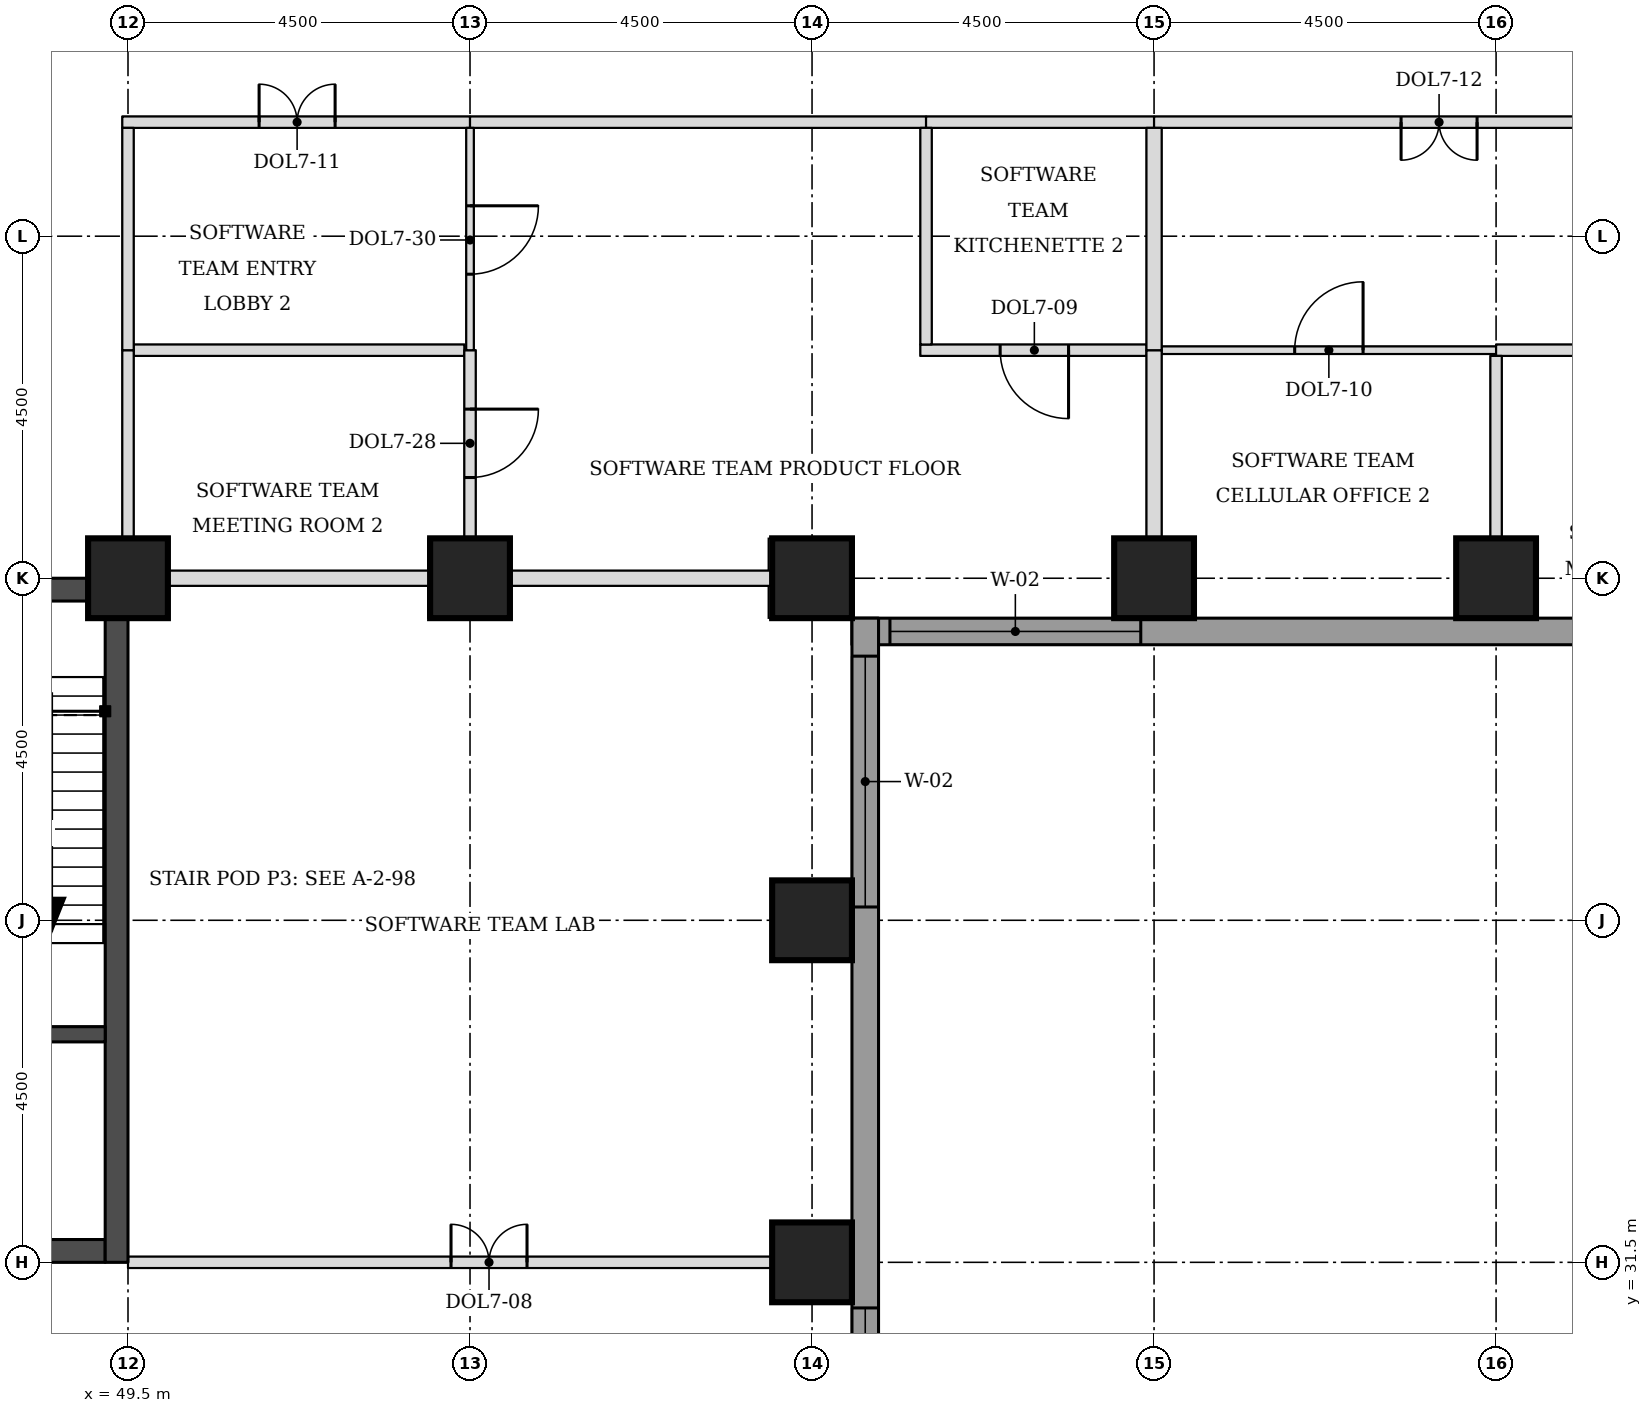
"""IFC4 building model, lengths in metres.
Left out: names, types, materials, properties, quantities, classifications, styles, units other than length and angle.
Written with IfcOpenShell. Run it as: python <this file> out.ifc"""

import sys

from ifc_helpers import new_model, si_unit, direction, frame, frame_2d, origin, origin_2d, place, context, subcontext, project, spatial, rectangle, extrude, element, fill, save


model = new_model("IFC4")
c1 = context("Model", 3, precision=1e-05, world=origin(), true_north=direction((0.0, 1.0)))
c2 = subcontext(c1, "Body", "Model", "MODEL_VIEW")
j1 = project(units=[si_unit("LENGTHUNIT", "METRE"), si_unit("PLANEANGLEUNIT", "RADIAN")], contexts=[c1])
p1 = place(None, origin())
s1 = spatial("IfcSite", under=j1, at=p1, CompositionType="ELEMENT")
p2 = place(p1, origin())
s2 = spatial("IfcBuilding", under=s1, at=p2, CompositionType="ELEMENT")
p3 = place(p2, frame((0.0, 0.0, 127.0)))
s3 = spatial("IfcBuildingStorey", under=s2, at=p3, CompositionType="ELEMENT", Elevation=127.0)
for number, where, z_axis, x_axis in (
    (1, (58.5, 31.5, 0.0), (0.0, 0.0, 1.0), (1.0, 0.0, 0.0)),
    (2, (58.5, 36.0, 0.0), (0.0, 0.0, 1.0), (1.0, 0.0, 0.0)),
    (3, (49.5, 40.5, 0.0), (0.0, 0.0, 1.0), (1.0, 0.0, 0.0)),
    (4, (54.0, 40.5, 0.0), (0.0, 0.0, 1.0), (1.0, 0.0, 0.0)),
    (5, (58.5, 40.5, 0.0), (0.0, 0.0, 1.0), (1.0, 0.0, 0.0)),
    (6, (63.0, 40.5, 0.0), (0.0, 0.0, 1.0), (1.0, 0.0, 0.0)),
    (7, (67.5, 40.5, 0.0), (0.0, 0.0, 1.0), (1.0, 0.0, 0.0)),
):
    element("IfcColumn", number, at=place(p3, frame(where, z_axis=z_axis, x_axis=x_axis)), inside=s3, PredefinedType="COLUMN", context=c2, shape_type="SweptSolid", body=[
        extrude(rectangle(XDim=1.05, YDim=1.05, at=origin_2d()), origin(), (0.0, 0.0, 1.0), 3.7),
    ])
p4 = place(p3, frame((40.8, 31.65, 0.0), z_axis=(0.0, 0.0, 1.0), x_axis=(1.0, 0.0, 0.0)))
e8 = element("IfcWall", 8, at=p4, inside=s3, PredefinedType="SHEAR", context=c2, shape_type="SweptSolid", body=[
    extrude(rectangle(XDim=8.4, YDim=0.3, at=frame_2d((4.2, 0.0))), origin(), (0.0, 0.0, 1.0), 3.7),
])
p5 = place(p4, frame((5.2, 0.0, 0.0)))
e9 = element("IfcOpeningElement", 9, at=p5, cuts=e8, PredefinedType="OPENING", context=c2, shape_type="SweptSolid", body=[
    extrude(rectangle(XDim=1.0, YDim=2.1, at=frame_2d((0.5, 1.05))), frame((0.0, 0.16, 0.0), z_axis=(0.0, -1.0, 0.0), x_axis=(1.0, 0.0, 0.0)), (0.0, 0.0, 1.0), 0.32),
])
p6 = place(p3, frame((40.8, 40.35, 0.0), z_axis=(0.0, 0.0, 1.0), x_axis=(1.0, 0.0, 0.0)))
e10 = element("IfcWall", 10, at=p6, inside=s3, PredefinedType="SHEAR", context=c2, shape_type="SweptSolid", body=[
    extrude(rectangle(XDim=8.4, YDim=0.3, at=frame_2d((4.2, 0.0))), origin(), (0.0, 0.0, 1.0), 3.7),
])
p7 = place(p6, frame((6.4, 0.0, 0.0)))
e11 = element("IfcOpeningElement", 11, at=p7, cuts=e10, PredefinedType="OPENING", context=c2, shape_type="SweptSolid", body=[
    extrude(rectangle(XDim=1.1, YDim=2.1, at=frame_2d((0.55, 1.05))), frame((0.0, 0.16, 0.0), z_axis=(0.0, -1.0, 0.0), x_axis=(1.0, 0.0, 0.0)), (0.0, 0.0, 1.0), 0.32),
])
p8 = place(p3, frame((49.35, 31.5, 0.0), z_axis=(0.0, 0.0, 1.0), x_axis=(0.0, 1.0, 0.0)))
e12 = element("IfcWall", 12, at=p8, inside=s3, PredefinedType="SHEAR", context=c2, shape_type="SweptSolid", body=[
    extrude(rectangle(XDim=9.0, YDim=0.3, at=frame_2d((4.5, 0.0))), origin(), (0.0, 0.0, 1.0), 3.7),
])
p9 = place(p3, frame((59.025, 39.8, 0.0), z_axis=(0.0, 0.0, 1.0), x_axis=(1.0, 0.0, 0.0)))
e13 = element("IfcWall", 13, at=p9, inside=s3, PredefinedType="STANDARD", context=c2, shape_type="SweptSolid", body=[
    extrude(rectangle(XDim=13.337, YDim=0.35, at=frame_2d((6.669, 0.0))), origin(), (0.0, 0.0, 1.0), 3.525),
])
p10 = place(p9, frame((0.5, 0.0, 0.9)))
e14 = element("IfcOpeningElement", 14, at=p10, cuts=e13, PredefinedType="OPENING", context=c2, shape_type="SweptSolid", body=[
    extrude(rectangle(XDim=3.3, YDim=1.9, at=frame_2d((1.65, 0.95))), frame((0.0, 0.185, 0.0), z_axis=(0.0, -1.0, 0.0), x_axis=(1.0, 0.0, 0.0)), (0.0, 0.0, 1.0), 0.37),
])
p11 = place(p3, frame((59.2, 22.138, 0.0), z_axis=(0.0, 0.0, 1.0), x_axis=(0.0, 1.0, 0.0)))
e15 = element("IfcWall", 15, at=p11, inside=s3, PredefinedType="STANDARD", context=c2, shape_type="SweptSolid", body=[
    extrude(rectangle(XDim=17.837, YDim=0.35, at=frame_2d((8.919, 0.0))), origin(), (0.0, 0.0, 1.0), 3.525),
])
p12 = place(p11, frame((5.462, 0.0, 0.9)))
e16 = element("IfcOpeningElement", 16, at=p12, cuts=e15, PredefinedType="OPENING", context=c2, shape_type="SweptSolid", body=[
    extrude(rectangle(XDim=3.3, YDim=1.9, at=frame_2d((1.65, 0.95))), frame((0.0, 0.185, 0.0), z_axis=(0.0, -1.0, 0.0), x_axis=(1.0, 0.0, 0.0)), (0.0, 0.0, 1.0), 0.37),
])
p13 = place(p11, frame((14.037, 0.0, 0.9)))
e17 = element("IfcOpeningElement", 17, at=p13, cuts=e15, PredefinedType="OPENING", context=c2, shape_type="SweptSolid", body=[
    extrude(rectangle(XDim=3.3, YDim=1.9, at=frame_2d((1.65, 0.95))), frame((0.0, 0.185, 0.0), z_axis=(0.0, -1.0, 0.0), x_axis=(1.0, 0.0, 0.0)), (0.0, 0.0, 1.0), 0.37),
])
p14 = place(p3, frame((49.5, 31.5, 0.0), z_axis=(0.0, 0.0, 1.0), x_axis=(1.0, 0.0, 0.0)))
e18 = element("IfcWall", 18, at=p14, inside=s3, PredefinedType="PARTITIONING", context=c2, shape_type="SweptSolid", body=[
    extrude(rectangle(XDim=9.525, YDim=0.15, at=frame_2d((4.762, 0.0))), origin(), (0.0, 0.0, 1.0), 2.55),
])
p15 = place(p14, frame((4.25, 0.0, 0.0)))
e19 = element("IfcOpeningElement", 19, at=p15, cuts=e18, PredefinedType="OPENING", context=c2, shape_type="SweptSolid", body=[
    extrude(rectangle(XDim=1.0, YDim=2.1, at=frame_2d((0.5, 1.05))), frame((0.0, 0.085, 0.0), z_axis=(0.0, -1.0, 0.0), x_axis=(1.0, 0.0, 0.0)), (0.0, 0.0, 1.0), 0.17),
])
p16 = place(p3, frame((50.015, 40.5, 0.0), z_axis=(0.0, 0.0, 1.0), x_axis=(1.0, 0.0, 0.0)))
e20 = element("IfcWall", 20, at=p16, inside=s3, PredefinedType="PARTITIONING", context=c2, shape_type="SweptSolid", body=[
    extrude(rectangle(XDim=3.46, YDim=0.2, at=frame_2d((1.73, 0.0))), origin(), (0.0, 0.0, 1.0), 2.8),
])
p17 = place(p3, frame((54.495, 40.5, 0.0), z_axis=(0.0, 0.0, 1.0), x_axis=(1.0, 0.0, 0.0)))
e21 = element("IfcWall", 21, at=p17, inside=s3, PredefinedType="PARTITIONING", context=c2, shape_type="SweptSolid", body=[
    extrude(rectangle(XDim=3.48, YDim=0.2, at=frame_2d((1.74, 0.0))), origin(), (0.0, 0.0, 1.0), 2.8),
])
p18 = place(p3, frame((49.575, 43.5, 0.0), z_axis=(0.0, 0.0, 1.0), x_axis=(1.0, 0.0, 0.0)))
e22 = element("IfcWall", 22, at=p18, inside=s3, PredefinedType="PARTITIONING", context=c2, shape_type="SweptSolid", body=[
    extrude(rectangle(XDim=4.35, YDim=0.15, at=frame_2d((2.175, 0.0))), origin(), (0.0, 0.0, 1.0), 3.55),
])
p19 = place(p3, frame((59.925, 43.5, 0.0), z_axis=(0.0, 0.0, 1.0), x_axis=(1.0, 0.0, 0.0)))
e23 = element("IfcWall", 23, at=p19, inside=s3, PredefinedType="PARTITIONING", context=c2, shape_type="SweptSolid", body=[
    extrude(rectangle(XDim=2.975, YDim=0.15, at=frame_2d((1.487, 0.0))), origin(), (0.0, 0.0, 1.0), 3.55),
])
p20 = place(p19, frame((1.05, 0.0, 0.0)))
e24 = element("IfcOpeningElement", 24, at=p20, cuts=e23, PredefinedType="OPENING", context=c2, shape_type="SweptSolid", body=[
    extrude(rectangle(XDim=0.9, YDim=2.1, at=frame_2d((0.45, 1.05))), frame((0.0, 0.085, 0.0), z_axis=(0.0, -1.0, 0.0), x_axis=(1.0, 0.0, 0.0)), (0.0, 0.0, 1.0), 0.17),
])
p21 = place(p3, frame((63.1, 43.5, 0.0), z_axis=(0.0, 0.0, 1.0), x_axis=(1.0, 0.0, 0.0)))
e25 = element("IfcWall", 25, at=p21, inside=s3, PredefinedType="PARTITIONING", context=c2, shape_type="SweptSolid", body=[
    extrude(rectangle(XDim=4.4, YDim=0.1, at=frame_2d((2.2, 0.0))), origin(), (0.0, 0.0, 1.0), 3.55),
])
p22 = place(p21, frame((1.75, 0.0, 0.0)))
e26 = element("IfcOpeningElement", 26, at=p22, cuts=e25, PredefinedType="OPENING", context=c2, shape_type="SweptSolid", body=[
    extrude(rectangle(XDim=0.9, YDim=2.1, at=frame_2d((0.45, 1.05))), frame((0.0, 0.06, 0.0), z_axis=(0.0, -1.0, 0.0), x_axis=(1.0, 0.0, 0.0)), (0.0, 0.0, 1.0), 0.12),
])
p23 = place(p3, frame((67.5, 43.5, 0.0), z_axis=(0.0, 0.0, 1.0), x_axis=(1.0, 0.0, 0.0)))
e27 = element("IfcWall", 27, at=p23, inside=s3, PredefinedType="PARTITIONING", context=c2, shape_type="SweptSolid", body=[
    extrude(rectangle(XDim=4.575, YDim=0.15, at=frame_2d((2.288, 0.0))), origin(), (0.0, 0.0, 1.0), 3.55),
])
p24 = place(p3, frame((49.425, 46.5, 0.0), z_axis=(0.0, 0.0, 1.0), x_axis=(1.0, 0.0, 0.0)))
e28 = element("IfcWall", 28, at=p24, inside=s3, PredefinedType="PARTITIONING", context=c2, shape_type="SweptSolid", body=[
    extrude(rectangle(XDim=4.575, YDim=0.15, at=frame_2d((2.288, 0.0))), origin(), (0.0, 0.0, 1.0), 3.55),
])
p25 = place(p24, frame((1.8, 0.0, 0.0)))
e29 = element("IfcOpeningElement", 29, at=p25, cuts=e28, PredefinedType="OPENING", context=c2, shape_type="SweptSolid", body=[
    extrude(rectangle(XDim=1.0, YDim=2.1, at=frame_2d((0.5, 1.05))), frame((0.0, 0.085, 0.0), z_axis=(0.0, -1.0, 0.0), x_axis=(1.0, 0.0, 0.0)), (0.0, 0.0, 1.0), 0.17),
])
p26 = place(p3, frame((54.0, 46.5, 0.0), z_axis=(0.0, 0.0, 1.0), x_axis=(1.0, 0.0, 0.0)))
e30 = element("IfcWall", 30, at=p26, inside=s3, PredefinedType="PARTITIONING", context=c2, shape_type="SweptSolid", body=[
    extrude(rectangle(XDim=6.0, YDim=0.15, at=frame_2d((3.0, 0.0))), origin(), (0.0, 0.0, 1.0), 3.55),
])
p27 = place(p3, frame((60.0, 46.5, 0.0), z_axis=(0.0, 0.0, 1.0), x_axis=(1.0, 0.0, 0.0)))
e31 = element("IfcWall", 31, at=p27, inside=s3, PredefinedType="PARTITIONING", context=c2, shape_type="SweptSolid", body=[
    extrude(rectangle(XDim=3.0, YDim=0.15, at=frame_2d((1.5, 0.0))), origin(), (0.0, 0.0, 1.0), 3.55),
])
p28 = place(p3, frame((63.0, 46.5, 0.0), z_axis=(0.0, 0.0, 1.0), x_axis=(1.0, 0.0, 0.0)))
e32 = element("IfcWall", 32, at=p28, inside=s3, PredefinedType="PARTITIONING", context=c2, shape_type="SweptSolid", body=[
    extrude(rectangle(XDim=7.5, YDim=0.15, at=frame_2d((3.75, 0.0))), origin(), (0.0, 0.0, 1.0), 3.55),
])
p29 = place(p28, frame((3.25, 0.0, 0.0)))
e33 = element("IfcOpeningElement", 33, at=p29, cuts=e32, PredefinedType="OPENING", context=c2, shape_type="SweptSolid", body=[
    extrude(rectangle(XDim=1.0, YDim=2.1, at=frame_2d((0.5, 1.05))), frame((0.0, 0.085, 0.0), z_axis=(0.0, -1.0, 0.0), x_axis=(1.0, 0.0, 0.0)), (0.0, 0.0, 1.0), 0.17),
])
p30 = place(p3, frame((63.0, 39.975, 0.0), z_axis=(0.0, 0.0, 1.0), x_axis=(0.0, 1.0, 0.0)))
e34 = element("IfcWall", 34, at=p30, inside=s3, PredefinedType="PARTITIONING", context=c2, shape_type="SweptSolid", body=[
    extrude(rectangle(XDim=3.525, YDim=0.2, at=frame_2d((1.762, 0.0))), origin(), (0.0, 0.0, 1.0), 3.55),
])
p31 = place(p3, frame((67.5, 39.975, 0.0), z_axis=(0.0, 0.0, 1.0), x_axis=(0.0, 1.0, 0.0)))
e35 = element("IfcWall", 35, at=p31, inside=s3, PredefinedType="PARTITIONING", context=c2, shape_type="SweptSolid", body=[
    extrude(rectangle(XDim=3.45, YDim=0.15, at=frame_2d((1.725, 0.0))), origin(), (0.0, 0.0, 1.0), 3.55),
])
p32 = place(p3, frame((49.5, 41.025, 0.0), z_axis=(0.0, 0.0, 1.0), x_axis=(0.0, 1.0, 0.0)))
e36 = element("IfcWall", 36, at=p32, inside=s3, PredefinedType="PARTITIONING", context=c2, shape_type="SweptSolid", body=[
    extrude(rectangle(XDim=2.475, YDim=0.15, at=frame_2d((1.238, 0.0))), origin(), (0.0, 0.0, 1.0), 3.55),
])
p33 = place(p3, frame((54.0, 41.025, 0.0), z_axis=(0.0, 0.0, 1.0), x_axis=(0.0, 1.0, 0.0)))
e37 = element("IfcWall", 37, at=p33, inside=s3, PredefinedType="PARTITIONING", context=c2, shape_type="SweptSolid", body=[
    extrude(rectangle(XDim=2.475, YDim=0.15, at=frame_2d((1.238, 0.0))), origin(), (0.0, 0.0, 1.0), 3.55),
])
p34 = place(p33, frame((0.8, 0.0, 0.0)))
e38 = element("IfcOpeningElement", 38, at=p34, cuts=e37, PredefinedType="OPENING", context=c2, shape_type="SweptSolid", body=[
    extrude(rectangle(XDim=0.9, YDim=2.1, at=frame_2d((0.45, 1.05))), frame((0.0, 0.085, 0.0), z_axis=(0.0, -1.0, 0.0), x_axis=(1.0, 0.0, 0.0)), (0.0, 0.0, 1.0), 0.17),
])
p35 = place(p3, frame((49.5, 43.5, 0.0), z_axis=(0.0, 0.0, 1.0), x_axis=(0.0, 1.0, 0.0)))
e39 = element("IfcWall", 39, at=p35, inside=s3, PredefinedType="PARTITIONING", context=c2, shape_type="SweptSolid", body=[
    extrude(rectangle(XDim=2.925, YDim=0.15, at=frame_2d((1.462, 0.0))), origin(), (0.0, 0.0, 1.0), 3.55),
])
p36 = place(p3, frame((54.0, 43.5, 0.0), z_axis=(0.0, 0.0, 1.0), x_axis=(0.0, 1.0, 0.0)))
e40 = element("IfcWall", 40, at=p36, inside=s3, PredefinedType="PARTITIONING", context=c2, shape_type="SweptSolid", body=[
    extrude(rectangle(XDim=2.925, YDim=0.1, at=frame_2d((1.462, 0.0))), origin(), (0.0, 0.0, 1.0), 3.55),
])
p37 = place(p36, frame((1.0, 0.0, 0.0)))
e41 = element("IfcOpeningElement", 41, at=p37, cuts=e40, PredefinedType="OPENING", context=c2, shape_type="SweptSolid", body=[
    extrude(rectangle(XDim=0.9, YDim=2.1, at=frame_2d((0.45, 1.05))), frame((0.0, 0.06, 0.0), z_axis=(0.0, -1.0, 0.0), x_axis=(1.0, 0.0, 0.0)), (0.0, 0.0, 1.0), 0.12),
])
p38 = place(p3, frame((63.0, 43.5, 0.0), z_axis=(0.0, 0.0, 1.0), x_axis=(0.0, 1.0, 0.0)))
e42 = element("IfcWall", 42, at=p38, inside=s3, PredefinedType="PARTITIONING", context=c2, shape_type="SweptSolid", body=[
    extrude(rectangle(XDim=2.925, YDim=0.2, at=frame_2d((1.462, 0.0))), origin(), (0.0, 0.0, 1.0), 3.55),
])
p39 = place(p3, frame((60.0, 43.575, 0.0), z_axis=(0.0, 0.0, 1.0), x_axis=(0.0, 1.0, 0.0)))
e43 = element("IfcWall", 43, at=p39, inside=s3, PredefinedType="PARTITIONING", context=c2, shape_type="SweptSolid", body=[
    extrude(rectangle(XDim=2.85, YDim=0.15, at=frame_2d((1.425, 0.0))), origin(), (0.0, 0.0, 1.0), 3.55),
])
p40 = place(p3, frame((46.2, 34.5, 0.0), z_axis=(0.0, 0.0, 1.0), x_axis=(1.0, 0.0, 0.0)))
e44 = element("IfcWall", 44, at=p40, inside=s3, PredefinedType="SOLIDWALL", context=c2, shape_type="SweptSolid", body=[
    extrude(rectangle(XDim=3.0, YDim=0.2, at=frame_2d((1.5, 0.0))), origin(), (0.0, 0.0, 1.0), 3.55),
])
p41 = place(p10, origin())
e45 = element("IfcWindow", 45, at=p41, inside=s3, PartitioningType="SINGLE_PANEL", PredefinedType="WINDOW", context=c2, shape_type="SweptSolid", body=[
    extrude(rectangle(XDim=3.3, YDim=1.9, at=frame_2d((1.65, 0.95))), frame((0.0, 0.085, 0.0), z_axis=(0.0, -1.0, 0.0), x_axis=(1.0, 0.0, 0.0)), (0.0, 0.0, 1.0), 0.06),
])
fill(e14, e45)
p42 = place(p12, origin())
e46 = element("IfcWindow", 46, at=p42, inside=s3, PartitioningType="SINGLE_PANEL", PredefinedType="WINDOW", context=c2, shape_type="SweptSolid", body=[
    extrude(rectangle(XDim=3.3, YDim=1.9, at=frame_2d((1.65, 0.95))), frame((0.0, 0.085, 0.0), z_axis=(0.0, -1.0, 0.0), x_axis=(1.0, 0.0, 0.0)), (0.0, 0.0, 1.0), 0.06),
])
fill(e16, e46)
p43 = place(p13, origin())
e47 = element("IfcWindow", 47, at=p43, inside=s3, PartitioningType="SINGLE_PANEL", PredefinedType="WINDOW", context=c2, shape_type="SweptSolid", body=[
    extrude(rectangle(XDim=3.3, YDim=1.9, at=frame_2d((1.65, 0.95))), frame((0.0, 0.085, 0.0), z_axis=(0.0, -1.0, 0.0), x_axis=(1.0, 0.0, 0.0)), (0.0, 0.0, 1.0), 0.06),
])
fill(e17, e47)
p44 = place(p15, origin())
e48 = element("IfcDoor", 48, at=p44, inside=s3, OperationType="DOUBLE_DOOR_SINGLE_SWING", PredefinedType="DOOR", context=c2, shape_type="SweptSolid", body=[
    extrude(rectangle(XDim=1.0, YDim=2.1, at=frame_2d((0.5, 1.05))), frame((0.0, 0.025, 0.0), z_axis=(0.0, -1.0, 0.0), x_axis=(1.0, 0.0, 0.0)), (0.0, 0.0, 1.0), 0.05),
])
fill(e19, e48)
p45 = place(p25, origin())
e49 = element("IfcDoor", 49, at=p45, inside=s3, OperationType="DOUBLE_DOOR_SINGLE_SWING", PredefinedType="DOOR", context=c2, shape_type="SweptSolid", body=[
    extrude(rectangle(XDim=1.0, YDim=2.1, at=frame_2d((0.5, 1.05))), frame((0.0, 0.025, 0.0), z_axis=(0.0, -1.0, 0.0), x_axis=(1.0, 0.0, 0.0)), (0.0, 0.0, 1.0), 0.05),
])
fill(e29, e49)
p46 = place(p37, frame((0.9, 0.0, 0.0), z_axis=(0.0, 0.0, 1.0), x_axis=(-1.0, 0.0, 0.0)))
e50 = element("IfcDoor", 50, at=p46, inside=s3, OperationType="SINGLE_SWING_LEFT", PredefinedType="DOOR", context=c2, shape_type="SweptSolid", body=[
    extrude(rectangle(XDim=0.9, YDim=2.1, at=frame_2d((0.45, 1.05))), frame((0.0, 0.025, 0.0), z_axis=(0.0, -1.0, 0.0), x_axis=(1.0, 0.0, 0.0)), (0.0, 0.0, 1.0), 0.05),
])
fill(e41, e50)
p47 = place(p20, frame((0.9, 0.0, 0.0), z_axis=(0.0, 0.0, 1.0), x_axis=(-1.0, 0.0, 0.0)))
e51 = element("IfcDoor", 51, at=p47, inside=s3, OperationType="SINGLE_SWING_LEFT", PredefinedType="DOOR", context=c2, shape_type="SweptSolid", body=[
    extrude(rectangle(XDim=0.9, YDim=2.1, at=frame_2d((0.45, 1.05))), frame((0.0, 0.025, 0.0), z_axis=(0.0, -1.0, 0.0), x_axis=(1.0, 0.0, 0.0)), (0.0, 0.0, 1.0), 0.05),
])
fill(e24, e51)
p48 = place(p34, frame((0.9, 0.0, 0.0), z_axis=(0.0, 0.0, 1.0), x_axis=(-1.0, 0.0, 0.0)))
e52 = element("IfcDoor", 52, at=p48, inside=s3, OperationType="SINGLE_SWING_LEFT", PredefinedType="DOOR", context=c2, shape_type="SweptSolid", body=[
    extrude(rectangle(XDim=0.9, YDim=2.1, at=frame_2d((0.45, 1.05))), frame((0.0, 0.025, 0.0), z_axis=(0.0, -1.0, 0.0), x_axis=(1.0, 0.0, 0.0)), (0.0, 0.0, 1.0), 0.05),
])
fill(e38, e52)
p49 = place(p29, frame((1.0, 0.0, 0.0), z_axis=(0.0, 0.0, 1.0), x_axis=(-1.0, 0.0, 0.0)))
e53 = element("IfcDoor", 53, at=p49, inside=s3, OperationType="DOUBLE_DOOR_SINGLE_SWING", PredefinedType="DOOR", context=c2, shape_type="SweptSolid", body=[
    extrude(rectangle(XDim=1.0, YDim=2.1, at=frame_2d((0.5, 1.05))), frame((0.0, 0.025, 0.0), z_axis=(0.0, -1.0, 0.0), x_axis=(1.0, 0.0, 0.0)), (0.0, 0.0, 1.0), 0.05),
])
fill(e33, e53)
p50 = place(p22, origin())
e54 = element("IfcDoor", 54, at=p50, inside=s3, OperationType="SINGLE_SWING_RIGHT", PredefinedType="DOOR", context=c2, shape_type="SweptSolid", body=[
    extrude(rectangle(XDim=0.9, YDim=2.1, at=frame_2d((0.45, 1.05))), frame((0.0, 0.025, 0.0), z_axis=(0.0, -1.0, 0.0), x_axis=(1.0, 0.0, 0.0)), (0.0, 0.0, 1.0), 0.05),
])
fill(e26, e54)
save(model, sys.argv[1])
